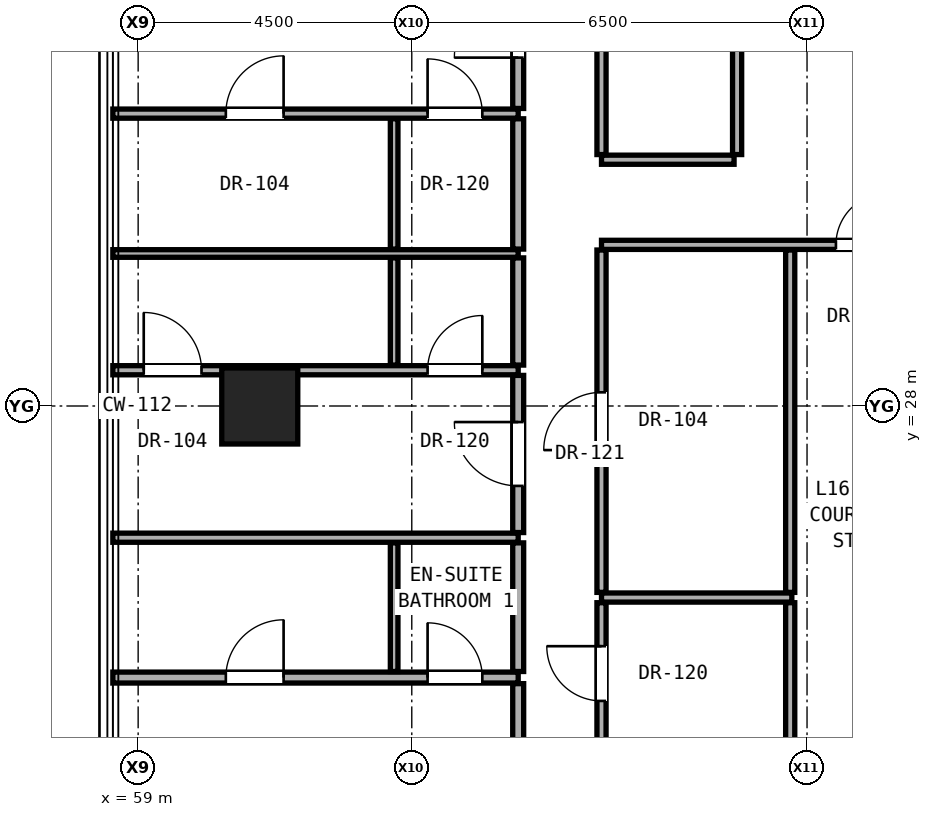
"""IFC4 building model, lengths in metres.
Left out: names, types, materials, properties, quantities, classifications, styles, units other than length and angle.
Written with IfcOpenShell. Run it as: python <this file> out.ifc"""

import sys

from ifc_helpers import new_model, si_unit, direction, frame, frame_2d, origin, origin_2d, place, context, subcontext, project, spatial, rectangle, hollow_rectangle, extrude, element, fill, save


model = new_model("IFC4")
c1 = context("Model", 3, precision=1e-05, world=origin(), true_north=direction((0.0, 1.0)))
c2 = subcontext(c1, "Body", "Model", "MODEL_VIEW")
j1 = project(units=[si_unit("LENGTHUNIT", "METRE"), si_unit("PLANEANGLEUNIT", "RADIAN")], contexts=[c1])
p1 = place(None, origin())
s1 = spatial("IfcSite", under=j1, at=p1, CompositionType="ELEMENT")
p2 = place(p1, origin())
s2 = spatial("IfcBuilding", under=s1, at=p2, CompositionType="ELEMENT")
p3 = place(p2, frame((0.0, 0.0, 58.7)))
s3 = spatial("IfcBuildingStorey", under=s2, at=p3, CompositionType="ELEMENT", Elevation=58.7)
p4 = place(p3, frame((61.0, 28.0, 0.0), z_axis=(0.0, 0.0, 1.0), x_axis=(1.0, 0.0, 0.0)))
e1 = element("IfcColumn", 1, at=p4, inside=s3, PredefinedType="COLUMN", context=c2, shape_type="SweptSolid", body=[
    extrude(hollow_rectangle(XDim=1.25, YDim=1.25, WallThickness=0.07, at=origin_2d()), origin(), (0.0, 0.0, 1.0), 3.3),
])
p5 = place(p3, frame((58.584, 23.534, 0.0), z_axis=(0.0, 0.0, 1.0), x_axis=(1.0, 0.0, 0.0)))
e2 = element("IfcWall", 2, at=p5, inside=s3, PredefinedType="PARTITIONING", context=c2, shape_type="SweptSolid", body=[
    extrude(rectangle(XDim=6.666, YDim=0.18, at=frame_2d((3.333, 0.0))), origin(), (0.0, 0.0, 1.0), 2.196),
])
p6 = place(p5, frame((1.858, 0.0, 0.0)))
e3 = element("IfcOpeningElement", 3, at=p6, cuts=e2, PredefinedType="OPENING", context=c2, shape_type="SweptSolid", body=[
    extrude(rectangle(XDim=0.95, YDim=2.15, at=frame_2d((0.475, 1.075))), frame((0.0, 0.1, 0.0), z_axis=(0.0, -1.0, 0.0), x_axis=(1.0, 0.0, 0.0)), (0.0, 0.0, 1.0), 0.2),
])
p7 = place(p5, frame((5.176, 0.0, 0.0)))
e4 = element("IfcOpeningElement", 4, at=p7, cuts=e2, PredefinedType="OPENING", context=c2, shape_type="SweptSolid", body=[
    extrude(rectangle(XDim=0.9, YDim=2.1, at=frame_2d((0.45, 1.05))), frame((0.0, 0.1, 0.0), z_axis=(0.0, -1.0, 0.0), x_axis=(1.0, 0.0, 0.0)), (0.0, 0.0, 1.0), 0.2),
])
p8 = place(p3, frame((66.62, 24.85, 0.0), z_axis=(0.0, 0.0, 1.0), x_axis=(1.0, 0.0, 0.0)))
e5 = element("IfcWall", 5, at=p8, inside=s3, PredefinedType="PARTITIONING", context=c2, shape_type="SweptSolid", body=[
    extrude(rectangle(XDim=3.13, YDim=0.15, at=frame_2d((1.565, 0.0))), origin(), (0.0, 0.0, 1.0), 2.125),
])
p9 = place(p3, frame((58.584, 25.834, 0.0), z_axis=(0.0, 0.0, 1.0), x_axis=(1.0, 0.0, 0.0)))
e6 = element("IfcWall", 6, at=p9, inside=s3, PredefinedType="PARTITIONING", context=c2, shape_type="SweptSolid", body=[
    extrude(rectangle(XDim=6.666, YDim=0.15, at=frame_2d((3.333, 0.0))), origin(), (0.0, 0.0, 1.0), 2.196),
])
p10 = place(p3, frame((58.584, 28.588, 0.0), z_axis=(0.0, 0.0, 1.0), x_axis=(1.0, 0.0, 0.0)))
e7 = element("IfcWall", 7, at=p10, inside=s3, PredefinedType="PARTITIONING", context=c2, shape_type="SweptSolid", body=[
    extrude(rectangle(XDim=6.666, YDim=0.15, at=frame_2d((3.333, 0.0))), origin(), (0.0, 0.0, 1.0), 2.196),
])
p11 = place(p10, frame((0.508, 0.0, 0.0)))
e8 = element("IfcOpeningElement", 8, at=p11, cuts=e7, PredefinedType="OPENING", context=c2, shape_type="SweptSolid", body=[
    extrude(rectangle(XDim=0.95, YDim=2.15, at=frame_2d((0.475, 1.075))), frame((0.0, 0.085, 0.0), z_axis=(0.0, -1.0, 0.0), x_axis=(1.0, 0.0, 0.0)), (0.0, 0.0, 1.0), 0.17),
])
p12 = place(p10, frame((5.176, 0.0, 0.0)))
e9 = element("IfcOpeningElement", 9, at=p12, cuts=e7, PredefinedType="OPENING", context=c2, shape_type="SweptSolid", body=[
    extrude(rectangle(XDim=0.9, YDim=2.1, at=frame_2d((0.45, 1.05))), frame((0.0, 0.085, 0.0), z_axis=(0.0, -1.0, 0.0), x_axis=(1.0, 0.0, 0.0)), (0.0, 0.0, 1.0), 0.17),
])
p13 = place(p3, frame((58.584, 30.508, 0.0), z_axis=(0.0, 0.0, 1.0), x_axis=(1.0, 0.0, 0.0)))
e10 = element("IfcWall", 10, at=p13, inside=s3, PredefinedType="PARTITIONING", context=c2, shape_type="SweptSolid", body=[
    extrude(rectangle(XDim=6.666, YDim=0.125, at=frame_2d((3.333, 0.0))), origin(), (0.0, 0.0, 1.0), 2.196),
])
p14 = place(p3, frame((66.62, 30.65, 0.0), z_axis=(0.0, 0.0, 1.0), x_axis=(1.0, 0.0, 0.0)))
e11 = element("IfcWall", 11, at=p14, inside=s3, PredefinedType="PARTITIONING", context=c2, shape_type="SweptSolid", body=[
    extrude(rectangle(XDim=19.63, YDim=0.15, at=frame_2d((9.815, 0.0))), origin(), (0.0, 0.0, 1.0), 2.125),
])
p15 = place(p14, frame((3.855, 0.0, 0.0)))
e12 = element("IfcOpeningElement", 12, at=p15, cuts=e11, PredefinedType="OPENING", context=c2, shape_type="SweptSolid", body=[
    extrude(rectangle(XDim=0.85, YDim=2.01, at=frame_2d((0.425, 1.005))), frame((0.0, 0.085, 0.0), z_axis=(0.0, -1.0, 0.0), x_axis=(1.0, 0.0, 0.0)), (0.0, 0.0, 1.0), 0.17),
])
p16 = place(p14, frame((12.085, 0.0, 0.0)))
e13 = element("IfcOpeningElement", 13, at=p16, cuts=e11, PredefinedType="OPENING", context=c2, shape_type="SweptSolid", body=[
    extrude(rectangle(XDim=0.85, YDim=2.01, at=frame_2d((0.425, 1.005))), frame((0.0, 0.085, 0.0), z_axis=(0.0, -1.0, 0.0), x_axis=(1.0, 0.0, 0.0)), (0.0, 0.0, 1.0), 0.17),
])
p17 = place(p3, frame((66.62, 32.05, 0.0), z_axis=(0.0, 0.0, 1.0), x_axis=(1.0, 0.0, 0.0)))
e14 = element("IfcWall", 14, at=p17, inside=s3, PredefinedType="PARTITIONING", context=c2, shape_type="SweptSolid", body=[
    extrude(rectangle(XDim=2.18, YDim=0.15, at=frame_2d((1.09, 0.0))), origin(), (0.0, 0.0, 1.0), 2.125),
])
p18 = place(p3, frame((58.584, 32.808, 0.0), z_axis=(0.0, 0.0, 1.0), x_axis=(1.0, 0.0, 0.0)))
e15 = element("IfcWall", 15, at=p18, inside=s3, PredefinedType="PARTITIONING", context=c2, shape_type="SweptSolid", body=[
    extrude(rectangle(XDim=6.666, YDim=0.15, at=frame_2d((3.333, 0.0))), origin(), (0.0, 0.0, 1.0), 2.196),
])
p19 = place(p18, frame((1.858, 0.0, 0.0)))
e16 = element("IfcOpeningElement", 16, at=p19, cuts=e15, PredefinedType="OPENING", context=c2, shape_type="SweptSolid", body=[
    extrude(rectangle(XDim=0.95, YDim=2.15, at=frame_2d((0.475, 1.075))), frame((0.0, 0.085, 0.0), z_axis=(0.0, -1.0, 0.0), x_axis=(1.0, 0.0, 0.0)), (0.0, 0.0, 1.0), 0.17),
])
p20 = place(p18, frame((5.176, 0.0, 0.0)))
e17 = element("IfcOpeningElement", 17, at=p20, cuts=e15, PredefinedType="OPENING", context=c2, shape_type="SweptSolid", body=[
    extrude(rectangle(XDim=0.9, YDim=2.1, at=frame_2d((0.45, 1.05))), frame((0.0, 0.085, 0.0), z_axis=(0.0, -1.0, 0.0), x_axis=(1.0, 0.0, 0.0)), (0.0, 0.0, 1.0), 0.17),
])
p21 = place(p3, frame((63.21, 23.634, 0.0), z_axis=(0.0, 0.0, 1.0), x_axis=(0.0, 1.0, 0.0)))
e18 = element("IfcWall", 18, at=p21, inside=s3, PredefinedType="PARTITIONING", context=c2, shape_type="SweptSolid", body=[
    extrude(rectangle(XDim=2.115, YDim=0.125, at=frame_2d((1.058, 0.0))), origin(), (0.0, 0.0, 1.0), 3.06),
])
p22 = place(p3, frame((63.21, 28.673, 0.0), z_axis=(0.0, 0.0, 1.0), x_axis=(0.0, 1.0, 0.0)))
e19 = element("IfcWall", 19, at=p22, inside=s3, PredefinedType="PARTITIONING", context=c2, shape_type="SweptSolid", body=[
    extrude(rectangle(XDim=1.762, YDim=0.125, at=frame_2d((0.881, 0.0))), origin(), (0.0, 0.0, 1.0), 3.06),
])
p23 = place(p3, frame((63.21, 30.581, 0.0), z_axis=(0.0, 0.0, 1.0), x_axis=(0.0, 1.0, 0.0)))
e20 = element("IfcWall", 20, at=p23, inside=s3, PredefinedType="PARTITIONING", context=c2, shape_type="SweptSolid", body=[
    extrude(rectangle(XDim=2.142, YDim=0.125, at=frame_2d((1.071, 0.0))), origin(), (0.0, 0.0, 1.0), 3.06),
])
p24 = place(p3, frame((65.25, 20.385, 0.0), z_axis=(0.0, 0.0, 1.0), x_axis=(0.0, 1.0, 0.0)))
e21 = element("IfcWall", 21, at=p24, inside=s3, PredefinedType="PARTITIONING", context=c2, shape_type="SweptSolid", body=[
    extrude(rectangle(XDim=3.049, YDim=0.18, at=frame_2d((1.524, 0.0))), origin(), (0.0, 0.0, 1.0), 2.452),
])
p25 = place(p24, frame((1.0, 0.0, 0.0)))
e22 = element("IfcOpeningElement", 22, at=p25, cuts=e21, PredefinedType="OPENING", context=c2, shape_type="SweptSolid", body=[
    extrude(rectangle(XDim=1.05, YDim=2.2, at=frame_2d((0.525, 1.1))), frame((0.0, 0.1, 0.0), z_axis=(0.0, -1.0, 0.0), x_axis=(1.0, 0.0, 0.0)), (0.0, 0.0, 1.0), 0.2),
])
p26 = place(p3, frame((65.25, 23.634, 0.0), z_axis=(0.0, 0.0, 1.0), x_axis=(0.0, 1.0, 0.0)))
e23 = element("IfcWall", 23, at=p26, inside=s3, PredefinedType="PARTITIONING", context=c2, shape_type="SweptSolid", body=[
    extrude(rectangle(XDim=2.115, YDim=0.18, at=frame_2d((1.058, 0.0))), origin(), (0.0, 0.0, 1.0), 3.06),
])
p27 = place(p3, frame((65.25, 25.919, 0.0), z_axis=(0.0, 0.0, 1.0), x_axis=(0.0, 1.0, 0.0)))
e24 = element("IfcWall", 24, at=p27, inside=s3, PredefinedType="PARTITIONING", context=c2, shape_type="SweptSolid", body=[
    extrude(rectangle(XDim=2.584, YDim=0.18, at=frame_2d((1.292, 0.0))), origin(), (0.0, 0.0, 1.0), 2.279),
])
p28 = place(p27, frame((0.767, 0.0, 0.0)))
e25 = element("IfcOpeningElement", 25, at=p28, cuts=e24, PredefinedType="OPENING", context=c2, shape_type="SweptSolid", body=[
    extrude(rectangle(XDim=1.05, YDim=2.2, at=frame_2d((0.525, 1.1))), frame((0.0, 0.1, 0.0), z_axis=(0.0, -1.0, 0.0), x_axis=(1.0, 0.0, 0.0)), (0.0, 0.0, 1.0), 0.2),
])
p29 = place(p3, frame((65.25, 28.673, 0.0), z_axis=(0.0, 0.0, 1.0), x_axis=(0.0, 1.0, 0.0)))
e26 = element("IfcWall", 26, at=p29, inside=s3, PredefinedType="PARTITIONING", context=c2, shape_type="SweptSolid", body=[
    extrude(rectangle(XDim=1.762, YDim=0.18, at=frame_2d((0.881, 0.0))), origin(), (0.0, 0.0, 1.0), 3.06),
])
p30 = place(p3, frame((65.25, 30.581, 0.0), z_axis=(0.0, 0.0, 1.0), x_axis=(0.0, 1.0, 0.0)))
e27 = element("IfcWall", 27, at=p30, inside=s3, PredefinedType="PARTITIONING", context=c2, shape_type="SweptSolid", body=[
    extrude(rectangle(XDim=2.142, YDim=0.18, at=frame_2d((1.071, 0.0))), origin(), (0.0, 0.0, 1.0), 3.06),
])
p31 = place(p3, frame((65.25, 32.893, 0.0), z_axis=(0.0, 0.0, 1.0), x_axis=(0.0, 1.0, 0.0)))
e28 = element("IfcWall", 28, at=p31, inside=s3, PredefinedType="PARTITIONING", context=c2, shape_type="SweptSolid", body=[
    extrude(rectangle(XDim=2.722, YDim=0.18, at=frame_2d((1.361, 0.0))), origin(), (0.0, 0.0, 1.0), 2.452),
])
p32 = place(p31, frame((0.836, 0.0, 0.0)))
e29 = element("IfcOpeningElement", 29, at=p32, cuts=e28, PredefinedType="OPENING", context=c2, shape_type="SweptSolid", body=[
    extrude(rectangle(XDim=1.05, YDim=2.2, at=frame_2d((0.525, 1.1))), frame((0.0, 0.1, 0.0), z_axis=(0.0, -1.0, 0.0), x_axis=(1.0, 0.0, 0.0)), (0.0, 0.0, 1.0), 0.2),
])
p33 = place(p3, frame((66.62, 22.435, 0.0), z_axis=(0.0, 0.0, 1.0), x_axis=(0.0, 1.0, 0.0)))
e30 = element("IfcWall", 30, at=p33, inside=s3, PredefinedType="PARTITIONING", context=c2, shape_type="SweptSolid", body=[
    extrude(rectangle(XDim=2.33, YDim=0.15, at=frame_2d((1.165, 0.0))), origin(), (0.0, 0.0, 1.0), 3.06),
])
p34 = place(p33, frame((0.715, 0.0, 0.0)))
e31 = element("IfcOpeningElement", 31, at=p34, cuts=e30, PredefinedType="OPENING", context=c2, shape_type="SweptSolid", body=[
    extrude(rectangle(XDim=0.9, YDim=2.1, at=frame_2d((0.45, 1.05))), frame((0.0, 0.085, 0.0), z_axis=(0.0, -1.0, 0.0), x_axis=(1.0, 0.0, 0.0)), (0.0, 0.0, 1.0), 0.17),
])
p35 = place(p3, frame((66.62, 24.935, 0.0), z_axis=(0.0, 0.0, 1.0), x_axis=(0.0, 1.0, 0.0)))
e32 = element("IfcWall", 32, at=p35, inside=s3, PredefinedType="PARTITIONING", context=c2, shape_type="SweptSolid", body=[
    extrude(rectangle(XDim=5.63, YDim=0.15, at=frame_2d((2.815, 0.0))), origin(), (0.0, 0.0, 1.0), 2.279),
])
p36 = place(p35, frame((2.34, 0.0, 0.0)))
e33 = element("IfcOpeningElement", 33, at=p36, cuts=e32, PredefinedType="OPENING", context=c2, shape_type="SweptSolid", body=[
    extrude(rectangle(XDim=0.95, YDim=2.15, at=frame_2d((0.475, 1.075))), frame((0.0, 0.085, 0.0), z_axis=(0.0, -1.0, 0.0), x_axis=(1.0, 0.0, 0.0)), (0.0, 0.0, 1.0), 0.17),
])
p37 = place(p3, frame((66.62, 32.135, 0.0), z_axis=(0.0, 0.0, 1.0), x_axis=(0.0, 1.0, 0.0)))
e34 = element("IfcWall", 34, at=p37, inside=s3, PredefinedType="PARTITIONING", context=c2, shape_type="SweptSolid", body=[
    extrude(rectangle(XDim=3.48, YDim=0.15, at=frame_2d((1.74, 0.0))), origin(), (0.0, 0.0, 1.0), 2.452),
])
p38 = place(p3, frame((68.85, 32.135, 0.0), z_axis=(0.0, 0.0, 1.0), x_axis=(0.0, 1.0, 0.0)))
e35 = element("IfcWall", 35, at=p38, inside=s3, PredefinedType="PARTITIONING", context=c2, shape_type="SweptSolid", body=[
    extrude(rectangle(XDim=2.745, YDim=0.15, at=frame_2d((1.373, 0.0))), origin(), (0.0, 0.0, 1.0), 3.06),
])
p39 = place(p3, frame((69.723, 22.435, 0.0), z_axis=(0.0, 0.0, 1.0), x_axis=(0.0, 1.0, 0.0)))
e36 = element("IfcWall", 36, at=p39, inside=s3, PredefinedType="PARTITIONING", context=c2, shape_type="SweptSolid", body=[
    extrude(rectangle(XDim=2.33, YDim=0.15, at=frame_2d((1.165, 0.0))), origin(), (0.0, 0.0, 1.0), 3.06),
])
p40 = place(p3, frame((69.723, 24.935, 0.0), z_axis=(0.0, 0.0, 1.0), x_axis=(0.0, 1.0, 0.0)))
e37 = element("IfcWall", 37, at=p40, inside=s3, PredefinedType="PARTITIONING", context=c2, shape_type="SweptSolid", body=[
    extrude(rectangle(XDim=5.63, YDim=0.15, at=frame_2d((2.815, 0.0))), origin(), (0.0, 0.0, 1.0), 2.125),
])
p41 = place(p34, origin())
e38 = element("IfcDoor", 38, at=p41, inside=s3, OperationType="SINGLE_SWING_RIGHT", PredefinedType="DOOR", context=c2, shape_type="SweptSolid", body=[
    extrude(rectangle(XDim=0.9, YDim=2.1, at=frame_2d((0.45, 1.05))), frame((0.0, 0.025, 0.0), z_axis=(0.0, -1.0, 0.0), x_axis=(1.0, 0.0, 0.0)), (0.0, 0.0, 1.0), 0.05),
])
fill(e31, e38)
p42 = place(p6, origin())
e39 = element("IfcDoor", 39, at=p42, inside=s3, OperationType="SINGLE_SWING_RIGHT", PredefinedType="DOOR", context=c2, shape_type="SweptSolid", body=[
    extrude(rectangle(XDim=0.95, YDim=2.15, at=frame_2d((0.475, 1.075))), frame((0.0, 0.025, 0.0), z_axis=(0.0, -1.0, 0.0), x_axis=(1.0, 0.0, 0.0)), (0.0, 0.0, 1.0), 0.05),
])
fill(e3, e39)
p43 = place(p7, origin())
e40 = element("IfcDoor", 40, at=p43, inside=s3, OperationType="SINGLE_SWING_LEFT", PredefinedType="DOOR", context=c2, shape_type="SweptSolid", body=[
    extrude(rectangle(XDim=0.9, YDim=2.1, at=frame_2d((0.45, 1.05))), frame((0.0, 0.025, 0.0), z_axis=(0.0, -1.0, 0.0), x_axis=(1.0, 0.0, 0.0)), (0.0, 0.0, 1.0), 0.05),
])
fill(e4, e40)
p44 = place(p28, origin())
e41 = element("IfcDoor", 41, at=p44, inside=s3, OperationType="SINGLE_SWING_RIGHT", PredefinedType="DOOR", context=c2, shape_type="SweptSolid", body=[
    extrude(rectangle(XDim=1.05, YDim=2.2, at=frame_2d((0.525, 1.1))), frame((0.0, 0.025, 0.0), z_axis=(0.0, -1.0, 0.0), x_axis=(1.0, 0.0, 0.0)), (0.0, 0.0, 1.0), 0.05),
])
fill(e25, e41)
p45 = place(p11, origin())
e42 = element("IfcDoor", 42, at=p45, inside=s3, OperationType="SINGLE_SWING_LEFT", PredefinedType="DOOR", context=c2, shape_type="SweptSolid", body=[
    extrude(rectangle(XDim=0.95, YDim=2.15, at=frame_2d((0.475, 1.075))), frame((0.0, 0.025, 0.0), z_axis=(0.0, -1.0, 0.0), x_axis=(1.0, 0.0, 0.0)), (0.0, 0.0, 1.0), 0.05),
])
fill(e8, e42)
p46 = place(p12, origin())
e43 = element("IfcDoor", 43, at=p46, inside=s3, OperationType="SINGLE_SWING_RIGHT", PredefinedType="DOOR", context=c2, shape_type="SweptSolid", body=[
    extrude(rectangle(XDim=0.9, YDim=2.1, at=frame_2d((0.45, 1.05))), frame((0.0, 0.025, 0.0), z_axis=(0.0, -1.0, 0.0), x_axis=(1.0, 0.0, 0.0)), (0.0, 0.0, 1.0), 0.05),
])
fill(e9, e43)
p47 = place(p32, origin())
e44 = element("IfcDoor", 44, at=p47, inside=s3, OperationType="SINGLE_SWING_LEFT", PredefinedType="DOOR", context=c2, shape_type="SweptSolid", body=[
    extrude(rectangle(XDim=1.05, YDim=2.2, at=frame_2d((0.525, 1.1))), frame((0.0, 0.025, 0.0), z_axis=(0.0, -1.0, 0.0), x_axis=(1.0, 0.0, 0.0)), (0.0, 0.0, 1.0), 0.05),
])
fill(e29, e44)
p48 = place(p19, origin())
e45 = element("IfcDoor", 45, at=p48, inside=s3, OperationType="SINGLE_SWING_RIGHT", PredefinedType="DOOR", context=c2, shape_type="SweptSolid", body=[
    extrude(rectangle(XDim=0.95, YDim=2.15, at=frame_2d((0.475, 1.075))), frame((0.0, 0.025, 0.0), z_axis=(0.0, -1.0, 0.0), x_axis=(1.0, 0.0, 0.0)), (0.0, 0.0, 1.0), 0.05),
])
fill(e16, e45)
p49 = place(p20, origin())
e46 = element("IfcDoor", 46, at=p49, inside=s3, OperationType="SINGLE_SWING_LEFT", PredefinedType="DOOR", context=c2, shape_type="SweptSolid", body=[
    extrude(rectangle(XDim=0.9, YDim=2.1, at=frame_2d((0.45, 1.05))), frame((0.0, 0.025, 0.0), z_axis=(0.0, -1.0, 0.0), x_axis=(1.0, 0.0, 0.0)), (0.0, 0.0, 1.0), 0.05),
])
fill(e17, e46)
p50 = place(p36, origin())
e47 = element("IfcDoor", 47, at=p50, inside=s3, OperationType="SINGLE_SWING_LEFT", PredefinedType="DOOR", context=c2, shape_type="SweptSolid", body=[
    extrude(rectangle(XDim=0.95, YDim=2.15, at=frame_2d((0.475, 1.075))), frame((0.0, 0.025, 0.0), z_axis=(0.0, -1.0, 0.0), x_axis=(1.0, 0.0, 0.0)), (0.0, 0.0, 1.0), 0.05),
])
fill(e33, e47)
p51 = place(p15, origin())
e48 = element("IfcDoor", 48, at=p51, inside=s3, OperationType="SINGLE_SWING_RIGHT", PredefinedType="DOOR", context=c2, shape_type="SweptSolid", body=[
    extrude(rectangle(XDim=0.85, YDim=2.01, at=frame_2d((0.425, 1.005))), frame((0.0, 0.025, 0.0), z_axis=(0.0, -1.0, 0.0), x_axis=(1.0, 0.0, 0.0)), (0.0, 0.0, 1.0), 0.05),
])
fill(e12, e48)
save(model, sys.argv[1])
